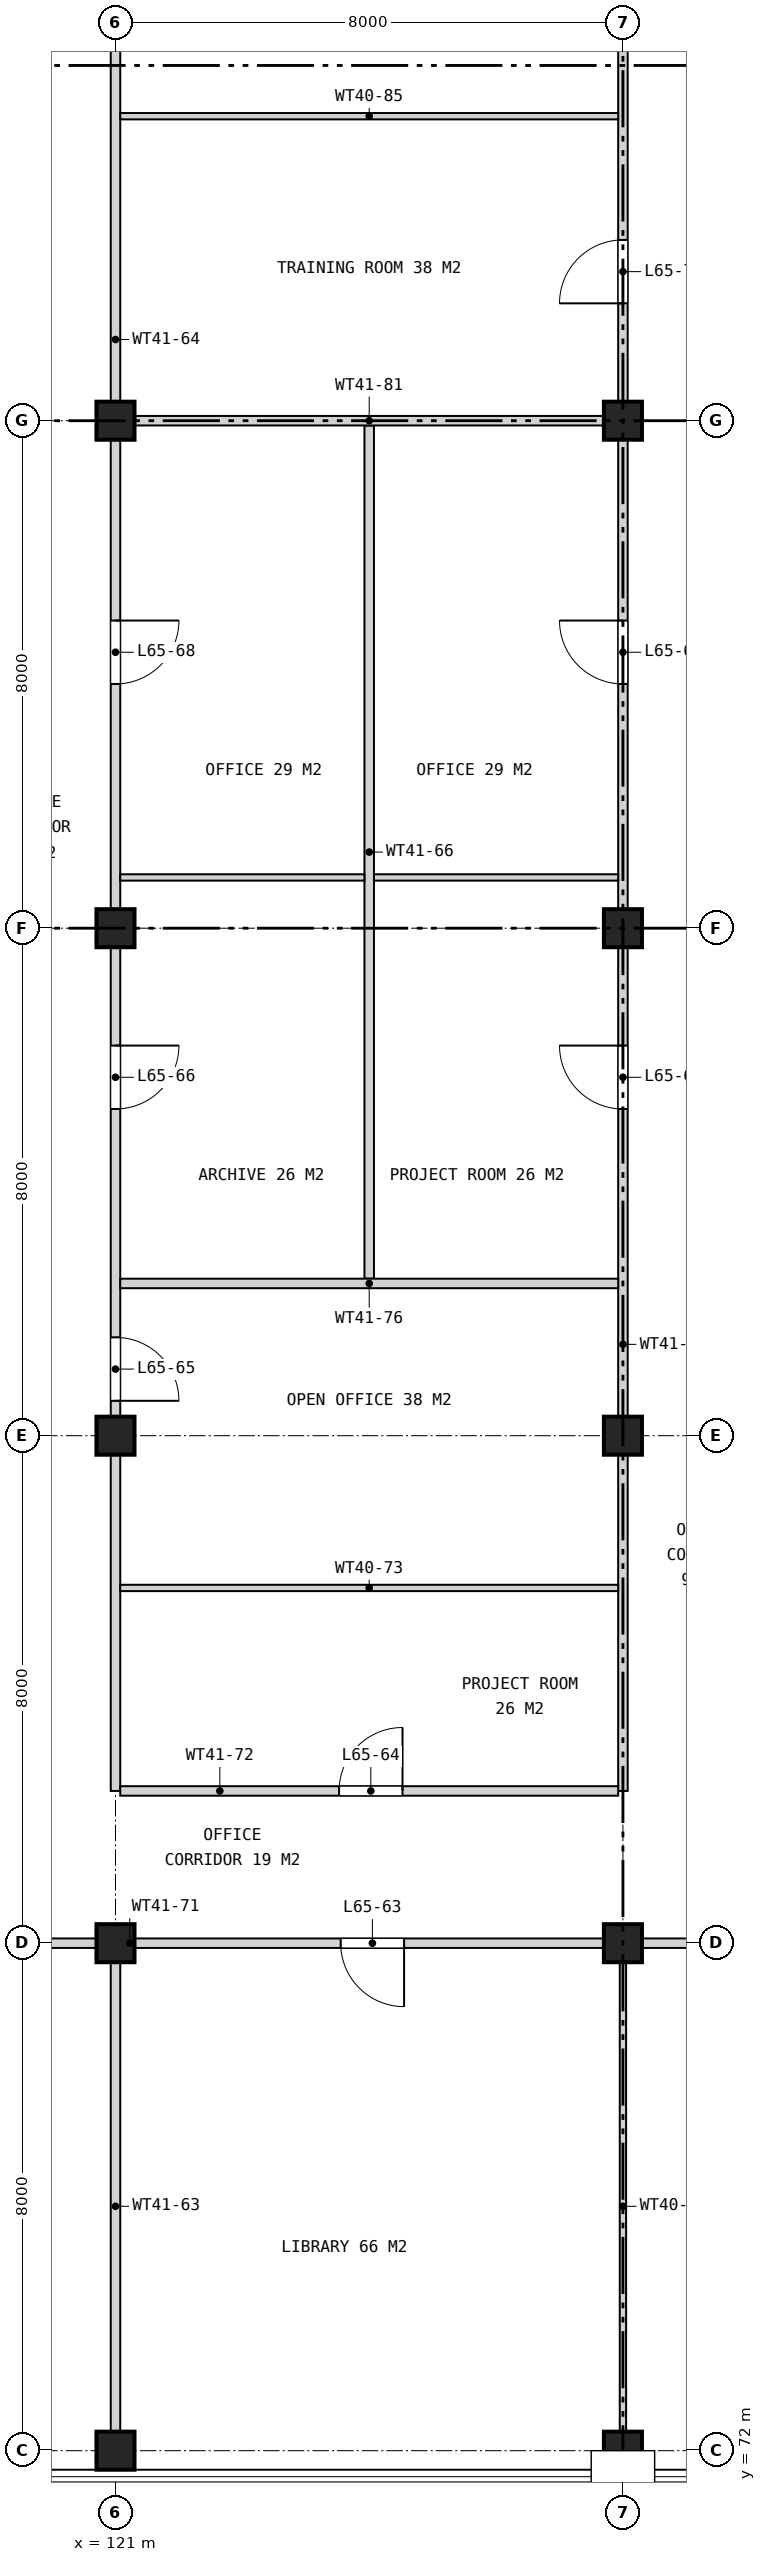
"""IFC4 building model, lengths in metres.
Left out: names, types, materials, properties, quantities, classifications, styles, units other than length and angle.
Written with IfcOpenShell. Run it as: python <this file> out.ifc"""

import sys

from ifc_helpers import new_model, si_unit, direction, frame, frame_2d, origin, origin_2d, place, context, subcontext, project, spatial, rectangle, extrude, element, fill, save


model = new_model("IFC4")
c1 = context("Model", 3, precision=1e-05, world=origin(), true_north=direction((0.0, 1.0)))
c2 = subcontext(c1, "Body", "Model", "MODEL_VIEW")
j1 = project(units=[si_unit("LENGTHUNIT", "METRE"), si_unit("PLANEANGLEUNIT", "RADIAN")], contexts=[c1])
p1 = place(None, origin())
s1 = spatial("IfcSite", under=j1, at=p1, CompositionType="ELEMENT")
p2 = place(p1, origin())
s2 = spatial("IfcBuilding", under=s1, at=p2, CompositionType="ELEMENT")
p3 = place(p2, frame((0.0, 0.0, 299.7)))
s3 = spatial("IfcBuildingStorey", under=s2, at=p3, CompositionType="ELEMENT", Elevation=299.7)
for number, where, z_axis, x_axis in (
    (1, (121.0, 72.0, 0.0), (0.0, 0.0, 1.0), (1.0, 0.0, 0.0)),
    (2, (121.0, 80.0, 0.0), (0.0, 0.0, 1.0), (1.0, 0.0, 0.0)),
    (3, (121.0, 88.0, 0.0), (0.0, 0.0, 1.0), (1.0, 0.0, 0.0)),
    (4, (121.0, 96.0, 0.0), (0.0, 0.0, 1.0), (1.0, 0.0, 0.0)),
    (5, (121.0, 104.0, 0.0), (0.0, 0.0, 1.0), (1.0, 0.0, 0.0)),
    (6, (129.0, 72.0, 0.0), (0.0, 0.0, 1.0), (1.0, 0.0, 0.0)),
    (7, (129.0, 80.0, 0.0), (0.0, 0.0, 1.0), (1.0, 0.0, 0.0)),
    (8, (129.0, 88.0, 0.0), (0.0, 0.0, 1.0), (1.0, 0.0, 0.0)),
    (9, (129.0, 96.0, 0.0), (0.0, 0.0, 1.0), (1.0, 0.0, 0.0)),
    (10, (129.0, 104.0, 0.0), (0.0, 0.0, 1.0), (1.0, 0.0, 0.0)),
):
    element("IfcColumn", number, at=place(p3, frame(where, z_axis=z_axis, x_axis=x_axis)), inside=s3, PredefinedType="COLUMN", context=c2, shape_type="SweptSolid", body=[
        extrude(rectangle(XDim=0.6, YDim=0.6, at=origin_2d()), origin(), (0.0, 0.0, 1.0), 4.2),
    ])
p4 = place(p3, frame((121.0, 71.78, 0.0), z_axis=(0.0, 0.0, 1.0), x_axis=(0.0, 1.0, 0.0)))
e11 = element("IfcWall", 11, at=p4, inside=s3, PredefinedType="PARTITIONING", context=c2, shape_type="SweptSolid", body=[
    extrude(rectangle(XDim=8.145, YDim=0.15, at=frame_2d((4.073, 0.0))), origin(), (0.0, 0.0, 1.0), 3.255),
])
p5 = place(p3, frame((121.0, 82.4, 0.0), z_axis=(0.0, 0.0, 1.0), x_axis=(0.0, 1.0, 0.0)))
e12 = element("IfcWall", 12, at=p5, inside=s3, PredefinedType="PARTITIONING", context=c2, shape_type="SweptSolid", body=[
    extrude(rectangle(XDim=35.2, YDim=0.15, at=frame_2d((17.6, 0.0))), origin(), (0.0, 0.0, 1.0), 3.255),
])
p6 = place(p5, frame((6.15, 0.0, 0.0)))
e13 = element("IfcOpeningElement", 13, at=p6, cuts=e12, PredefinedType="OPENING", context=c2, shape_type="SweptSolid", body=[
    extrude(rectangle(XDim=1.0, YDim=2.1, at=frame_2d((0.5, 1.05))), frame((0.0, 0.085, 0.0), z_axis=(0.0, -1.0, 0.0), x_axis=(1.0, 0.0, 0.0)), (0.0, 0.0, 1.0), 0.17),
])
p7 = place(p5, frame((10.75, 0.0, 0.0)))
e14 = element("IfcOpeningElement", 14, at=p7, cuts=e12, PredefinedType="OPENING", context=c2, shape_type="SweptSolid", body=[
    extrude(rectangle(XDim=1.0, YDim=2.1, at=frame_2d((0.5, 1.05))), frame((0.0, 0.085, 0.0), z_axis=(0.0, -1.0, 0.0), x_axis=(1.0, 0.0, 0.0)), (0.0, 0.0, 1.0), 0.17),
])
p8 = place(p5, frame((17.45, 0.0, 0.0)))
e15 = element("IfcOpeningElement", 15, at=p8, cuts=e12, PredefinedType="OPENING", context=c2, shape_type="SweptSolid", body=[
    extrude(rectangle(XDim=1.0, YDim=2.1, at=frame_2d((0.5, 1.05))), frame((0.0, 0.085, 0.0), z_axis=(0.0, -1.0, 0.0), x_axis=(1.0, 0.0, 0.0)), (0.0, 0.0, 1.0), 0.17),
])
p9 = place(p3, frame((125.0, 90.475, 0.0), z_axis=(0.0, 0.0, 1.0), x_axis=(0.0, 1.0, 0.0)))
e16 = element("IfcWall", 16, at=p9, inside=s3, PredefinedType="PARTITIONING", context=c2, shape_type="SweptSolid", body=[
    extrude(rectangle(XDim=13.45, YDim=0.15, at=frame_2d((6.725, 0.0))), origin(), (0.0, 0.0, 1.0), 3.255),
])
p10 = place(p3, frame((129.0, 71.78, 0.0), z_axis=(0.0, 0.0, 1.0), x_axis=(0.0, 1.0, 0.0)))
e17 = element("IfcWall", 17, at=p10, inside=s3, PredefinedType="PARTITIONING", context=c2, shape_type="SweptSolid", body=[
    extrude(rectangle(XDim=8.145, YDim=0.1, at=frame_2d((4.073, 0.0))), origin(), (0.0, 0.0, 1.0), 3.255),
])
p11 = place(p3, frame((129.0, 82.4, 0.0), z_axis=(0.0, 0.0, 1.0), x_axis=(0.0, 1.0, 0.0)))
e18 = element("IfcWall", 18, at=p11, inside=s3, PredefinedType="PARTITIONING", context=c2, shape_type="SweptSolid", body=[
    extrude(rectangle(XDim=35.2, YDim=0.15, at=frame_2d((17.6, 0.0))), origin(), (0.0, 0.0, 1.0), 3.255),
])
p12 = place(p11, frame((10.75, 0.0, 0.0)))
e19 = element("IfcOpeningElement", 19, at=p12, cuts=e18, PredefinedType="OPENING", context=c2, shape_type="SweptSolid", body=[
    extrude(rectangle(XDim=1.0, YDim=2.1, at=frame_2d((0.5, 1.05))), frame((0.0, 0.085, 0.0), z_axis=(0.0, -1.0, 0.0), x_axis=(1.0, 0.0, 0.0)), (0.0, 0.0, 1.0), 0.17),
])
p13 = place(p11, frame((17.45, 0.0, 0.0)))
e20 = element("IfcOpeningElement", 20, at=p13, cuts=e18, PredefinedType="OPENING", context=c2, shape_type="SweptSolid", body=[
    extrude(rectangle(XDim=1.0, YDim=2.1, at=frame_2d((0.5, 1.05))), frame((0.0, 0.085, 0.0), z_axis=(0.0, -1.0, 0.0), x_axis=(1.0, 0.0, 0.0)), (0.0, 0.0, 1.0), 0.17),
])
p14 = place(p11, frame((23.45, 0.0, 0.0)))
e21 = element("IfcOpeningElement", 21, at=p14, cuts=e18, PredefinedType="OPENING", context=c2, shape_type="SweptSolid", body=[
    extrude(rectangle(XDim=1.0, YDim=2.1, at=frame_2d((0.5, 1.05))), frame((0.0, 0.085, 0.0), z_axis=(0.0, -1.0, 0.0), x_axis=(1.0, 0.0, 0.0)), (0.0, 0.0, 1.0), 0.17),
])
p15 = place(p3, frame((118.7, 80.0, 0.0), z_axis=(0.0, 0.0, 1.0), x_axis=(1.0, 0.0, 0.0)))
e22 = element("IfcWall", 22, at=p15, inside=s3, PredefinedType="PARTITIONING", context=c2, shape_type="SweptSolid", body=[
    extrude(rectangle(XDim=12.625, YDim=0.15, at=frame_2d((6.312, 0.0))), origin(), (0.0, 0.0, 1.0), 3.255),
])
p16 = place(p15, frame((5.85, 0.0, 0.0)))
e23 = element("IfcOpeningElement", 23, at=p16, cuts=e22, PredefinedType="OPENING", context=c2, shape_type="SweptSolid", body=[
    extrude(rectangle(XDim=1.0, YDim=2.1, at=frame_2d((0.5, 1.05))), frame((0.0, 0.085, 0.0), z_axis=(0.0, -1.0, 0.0), x_axis=(1.0, 0.0, 0.0)), (0.0, 0.0, 1.0), 0.17),
])
p17 = place(p3, frame((121.075, 82.4, 0.0), z_axis=(0.0, 0.0, 1.0), x_axis=(1.0, 0.0, 0.0)))
e24 = element("IfcWall", 24, at=p17, inside=s3, PredefinedType="PARTITIONING", context=c2, shape_type="SweptSolid", body=[
    extrude(rectangle(XDim=7.85, YDim=0.15, at=frame_2d((3.925, 0.0))), origin(), (0.0, 0.0, 1.0), 3.255),
])
p18 = place(p17, frame((3.45, 0.0, 0.0)))
e25 = element("IfcOpeningElement", 25, at=p18, cuts=e24, PredefinedType="OPENING", context=c2, shape_type="SweptSolid", body=[
    extrude(rectangle(XDim=1.0, YDim=2.1, at=frame_2d((0.5, 1.05))), frame((0.0, 0.085, 0.0), z_axis=(0.0, -1.0, 0.0), x_axis=(1.0, 0.0, 0.0)), (0.0, 0.0, 1.0), 0.17),
])
p19 = place(p3, frame((121.075, 85.6, 0.0), z_axis=(0.0, 0.0, 1.0), x_axis=(1.0, 0.0, 0.0)))
e26 = element("IfcWall", 26, at=p19, inside=s3, PredefinedType="PARTITIONING", context=c2, shape_type="SweptSolid", body=[
    extrude(rectangle(XDim=7.85, YDim=0.1, at=frame_2d((3.925, 0.0))), origin(), (0.0, 0.0, 1.0), 3.255),
])
for number, where, z_axis, x_axis in (
    (27, (121.075, 90.4, 0.0), (0.0, 0.0, 1.0), (1.0, 0.0, 0.0)),
    (28, (121.075, 104.0, 0.0), (0.0, 0.0, 1.0), (1.0, 0.0, 0.0)),
):
    element("IfcWall", number, at=place(p3, frame(where, z_axis=z_axis, x_axis=x_axis)), inside=s3, PredefinedType="PARTITIONING", context=c2, shape_type="SweptSolid", body=[
        extrude(rectangle(XDim=7.85, YDim=0.15, at=frame_2d((3.925, 0.0))), origin(), (0.0, 0.0, 1.0), 3.255),
    ])
p20 = place(p3, frame((121.075, 108.8, 0.0), z_axis=(0.0, 0.0, 1.0), x_axis=(1.0, 0.0, 0.0)))
e29 = element("IfcWall", 29, at=p20, inside=s3, PredefinedType="PARTITIONING", context=c2, shape_type="SweptSolid", body=[
    extrude(rectangle(XDim=7.85, YDim=0.1, at=frame_2d((3.925, 0.0))), origin(), (0.0, 0.0, 1.0), 3.255),
])
for number, where, z_axis, x_axis in (
    (30, (121.075, 96.8, 0.0), (0.0, 0.0, 1.0), (1.0, 0.0, 0.0)),
    (31, (125.075, 96.8, 0.0), (0.0, 0.0, 1.0), (1.0, 0.0, 0.0)),
):
    element("IfcWall", number, at=place(p3, frame(where, z_axis=z_axis, x_axis=x_axis)), inside=s3, PredefinedType="PARTITIONING", context=c2, shape_type="SweptSolid", body=[
        extrude(rectangle(XDim=3.85, YDim=0.1, at=frame_2d((1.925, 0.0))), origin(), (0.0, 0.0, 1.0), 3.255),
    ])
p21 = place(p16, frame((1.0, 0.0, 0.0), z_axis=(0.0, 0.0, 1.0), x_axis=(-1.0, 0.0, 0.0)))
e32 = element("IfcDoor", 32, at=p21, inside=s3, OperationType="SINGLE_SWING_LEFT", PredefinedType="DOOR", context=c2, shape_type="SweptSolid", body=[
    extrude(rectangle(XDim=1.0, YDim=2.1, at=frame_2d((0.5, 1.05))), frame((0.0, 0.025, 0.0), z_axis=(0.0, -1.0, 0.0), x_axis=(1.0, 0.0, 0.0)), (0.0, 0.0, 1.0), 0.05),
])
fill(e23, e32)
p22 = place(p18, origin())
e33 = element("IfcDoor", 33, at=p22, inside=s3, OperationType="SINGLE_SWING_RIGHT", PredefinedType="DOOR", context=c2, shape_type="SweptSolid", body=[
    extrude(rectangle(XDim=1.0, YDim=2.1, at=frame_2d((0.5, 1.05))), frame((0.0, 0.025, 0.0), z_axis=(0.0, -1.0, 0.0), x_axis=(1.0, 0.0, 0.0)), (0.0, 0.0, 1.0), 0.05),
])
fill(e25, e33)
p23 = place(p6, frame((1.0, 0.0, 0.0), z_axis=(0.0, 0.0, 1.0), x_axis=(-1.0, 0.0, 0.0)))
e34 = element("IfcDoor", 34, at=p23, inside=s3, OperationType="SINGLE_SWING_RIGHT", PredefinedType="DOOR", context=c2, shape_type="SweptSolid", body=[
    extrude(rectangle(XDim=1.0, YDim=2.1, at=frame_2d((0.5, 1.05))), frame((0.0, 0.025, 0.0), z_axis=(0.0, -1.0, 0.0), x_axis=(1.0, 0.0, 0.0)), (0.0, 0.0, 1.0), 0.05),
])
fill(e13, e34)
p24 = place(p7, frame((1.0, 0.0, 0.0), z_axis=(0.0, 0.0, 1.0), x_axis=(-1.0, 0.0, 0.0)))
e35 = element("IfcDoor", 35, at=p24, inside=s3, OperationType="SINGLE_SWING_LEFT", PredefinedType="DOOR", context=c2, shape_type="SweptSolid", body=[
    extrude(rectangle(XDim=1.0, YDim=2.1, at=frame_2d((0.5, 1.05))), frame((0.0, 0.025, 0.0), z_axis=(0.0, -1.0, 0.0), x_axis=(1.0, 0.0, 0.0)), (0.0, 0.0, 1.0), 0.05),
])
fill(e14, e35)
p25 = place(p12, origin())
e36 = element("IfcDoor", 36, at=p25, inside=s3, OperationType="SINGLE_SWING_RIGHT", PredefinedType="DOOR", context=c2, shape_type="SweptSolid", body=[
    extrude(rectangle(XDim=1.0, YDim=2.1, at=frame_2d((0.5, 1.05))), frame((0.0, 0.025, 0.0), z_axis=(0.0, -1.0, 0.0), x_axis=(1.0, 0.0, 0.0)), (0.0, 0.0, 1.0), 0.05),
])
fill(e19, e36)
p26 = place(p8, frame((1.0, 0.0, 0.0), z_axis=(0.0, 0.0, 1.0), x_axis=(-1.0, 0.0, 0.0)))
e37 = element("IfcDoor", 37, at=p26, inside=s3, OperationType="SINGLE_SWING_LEFT", PredefinedType="DOOR", context=c2, shape_type="SweptSolid", body=[
    extrude(rectangle(XDim=1.0, YDim=2.1, at=frame_2d((0.5, 1.05))), frame((0.0, 0.025, 0.0), z_axis=(0.0, -1.0, 0.0), x_axis=(1.0, 0.0, 0.0)), (0.0, 0.0, 1.0), 0.05),
])
fill(e15, e37)
p27 = place(p13, origin())
e38 = element("IfcDoor", 38, at=p27, inside=s3, OperationType="SINGLE_SWING_RIGHT", PredefinedType="DOOR", context=c2, shape_type="SweptSolid", body=[
    extrude(rectangle(XDim=1.0, YDim=2.1, at=frame_2d((0.5, 1.05))), frame((0.0, 0.025, 0.0), z_axis=(0.0, -1.0, 0.0), x_axis=(1.0, 0.0, 0.0)), (0.0, 0.0, 1.0), 0.05),
])
fill(e20, e38)
p28 = place(p14, origin())
e39 = element("IfcDoor", 39, at=p28, inside=s3, OperationType="SINGLE_SWING_LEFT", PredefinedType="DOOR", context=c2, shape_type="SweptSolid", body=[
    extrude(rectangle(XDim=1.0, YDim=2.1, at=frame_2d((0.5, 1.05))), frame((0.0, 0.025, 0.0), z_axis=(0.0, -1.0, 0.0), x_axis=(1.0, 0.0, 0.0)), (0.0, 0.0, 1.0), 0.05),
])
fill(e21, e39)
save(model, sys.argv[1])
